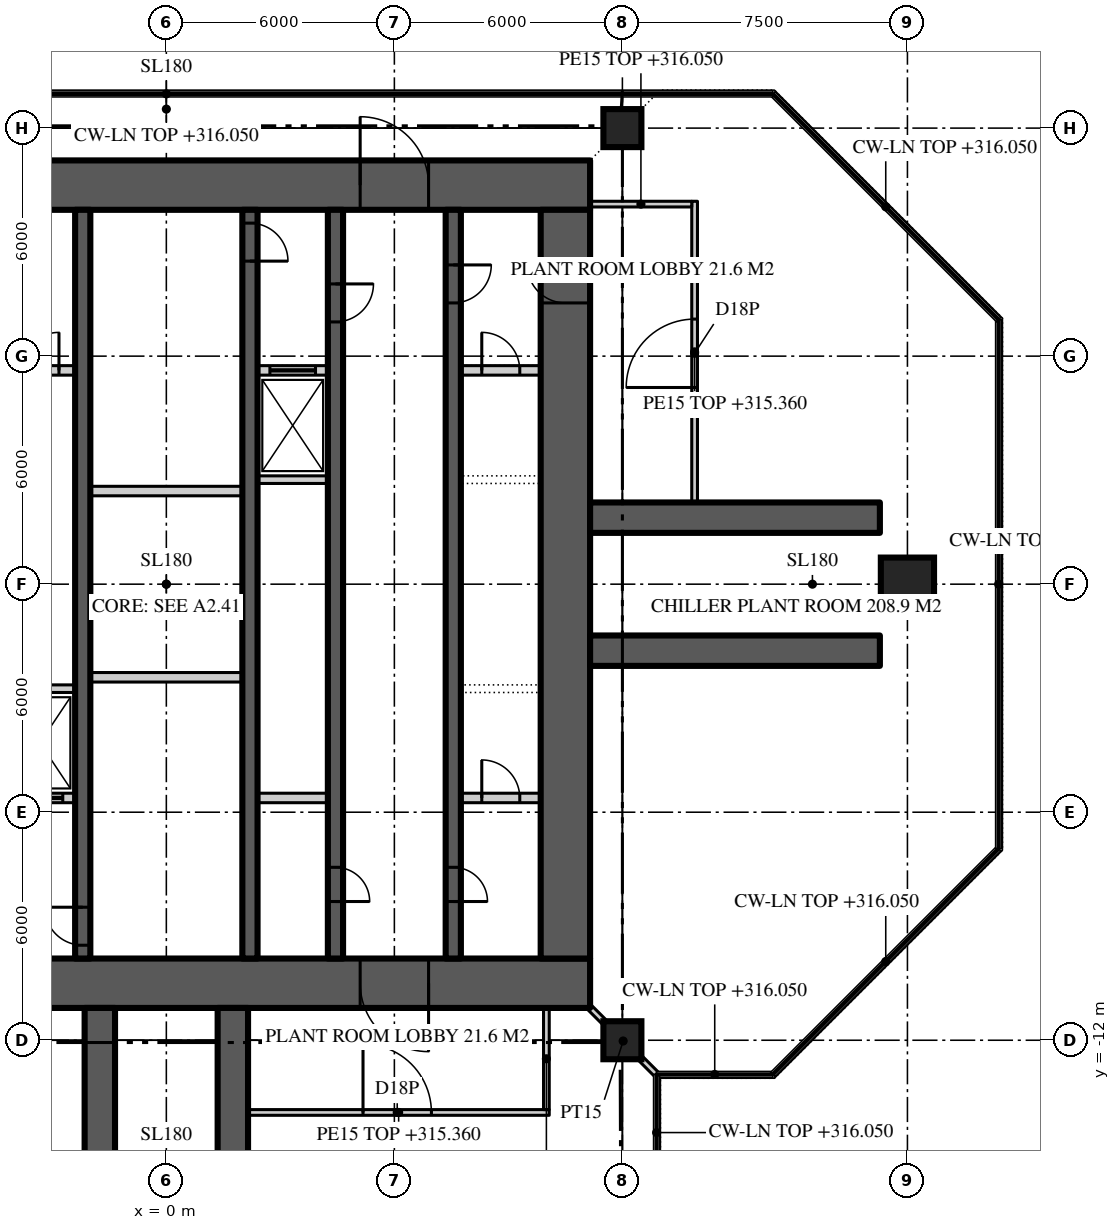
"""IFC4 building model, lengths in metres.
Left out: names, types, materials, properties, quantities, classifications, styles, units other than length and angle.
Written with IfcOpenShell. Run it as: python <this file> out.ifc"""

import sys

from ifc_helpers import new_model, si_unit, direction, frame, frame_2d, origin, origin_2d, place, context, subcontext, project, spatial, rectangle, extrude, element, fill, save


model = new_model("IFC4")
c1 = context("Model", 3, precision=1e-05, world=origin(), true_north=direction((0.0, 1.0)))
c2 = subcontext(c1, "Body", "Model", "MODEL_VIEW")
j1 = project(units=[si_unit("LENGTHUNIT", "METRE"), si_unit("PLANEANGLEUNIT", "RADIAN")], contexts=[c1])
p1 = place(None, origin())
s1 = spatial("IfcSite", under=j1, at=p1, CompositionType="ELEMENT")
p2 = place(p1, origin())
s2 = spatial("IfcBuilding", under=s1, at=p2, CompositionType="ELEMENT")
p3 = place(p2, frame((0.0, 0.0, 311.3)))
s3 = spatial("IfcBuildingStorey", under=s2, at=p3, CompositionType="ELEMENT", Elevation=311.3)
p4 = place(p3, frame((-11.15, 10.5, 0.0), z_axis=(0.0, 0.0, 1.0), x_axis=(1.0, 0.0, 0.0)))
e1 = element("IfcWall", 1, at=p4, inside=s3, PredefinedType="SHEAR", context=c2, shape_type="SweptSolid", body=[
    extrude(rectangle(XDim=22.3, YDim=1.3, at=frame_2d((11.15, 0.0))), origin(), (0.0, 0.0, 1.0), 5.0),
])
p5 = place(p4, frame((4.25, 0.0, 0.0)))
e2 = element("IfcOpeningElement", 2, at=p5, cuts=e1, PredefinedType="OPENING", context=c2, shape_type="SweptSolid", body=[
    extrude(rectangle(XDim=1.8, YDim=2.2, at=frame_2d((0.9, 1.1))), frame((0.0, 0.66, 0.0), z_axis=(0.0, -1.0, 0.0), x_axis=(1.0, 0.0, 0.0)), (0.0, 0.0, 1.0), 1.32),
])
p6 = place(p4, frame((16.25, 0.0, 0.0)))
e3 = element("IfcOpeningElement", 3, at=p6, cuts=e1, PredefinedType="OPENING", context=c2, shape_type="SweptSolid", body=[
    extrude(rectangle(XDim=1.8, YDim=2.2, at=frame_2d((0.9, 1.1))), frame((0.0, 0.66, 0.0), z_axis=(0.0, -1.0, 0.0), x_axis=(1.0, 0.0, 0.0)), (0.0, 0.0, 1.0), 1.32),
])
p7 = place(p3, frame((11.15, -10.5, 0.0), z_axis=(0.0, 0.0, 1.0), x_axis=(-1.0, 0.0, 0.0)))
e4 = element("IfcWall", 4, at=p7, inside=s3, PredefinedType="SHEAR", context=c2, shape_type="SweptSolid", body=[
    extrude(rectangle(XDim=22.3, YDim=1.3, at=frame_2d((11.15, 0.0))), origin(), (0.0, 0.0, 1.0), 5.0),
])
p8 = place(p7, frame((16.25, 0.0, 0.0)))
e5 = element("IfcOpeningElement", 5, at=p8, cuts=e4, PredefinedType="OPENING", context=c2, shape_type="SweptSolid", body=[
    extrude(rectangle(XDim=1.8, YDim=2.2, at=frame_2d((0.9, 1.1))), frame((0.0, 0.66, 0.0), z_axis=(0.0, -1.0, 0.0), x_axis=(1.0, 0.0, 0.0)), (0.0, 0.0, 1.0), 1.32),
])
p9 = place(p7, frame((4.25, 0.0, 0.0)))
e6 = element("IfcOpeningElement", 6, at=p9, cuts=e4, PredefinedType="OPENING", context=c2, shape_type="SweptSolid", body=[
    extrude(rectangle(XDim=1.8, YDim=2.2, at=frame_2d((0.9, 1.1))), frame((0.0, 0.66, 0.0), z_axis=(0.0, -1.0, 0.0), x_axis=(1.0, 0.0, 0.0)), (0.0, 0.0, 1.0), 1.32),
])
p10 = place(p3, frame((10.5, -9.85, 0.0), z_axis=(0.0, 0.0, 1.0), x_axis=(0.0, 1.0, 0.0)))
e7 = element("IfcWall", 7, at=p10, inside=s3, PredefinedType="SHEAR", context=c2, shape_type="SweptSolid", body=[
    extrude(rectangle(XDim=19.7, YDim=1.3, at=frame_2d((9.85, 0.0))), origin(), (0.0, 0.0, 1.0), 5.0),
])
p11 = place(p10, frame((17.25, 0.0, 0.0)))
e8 = element("IfcOpeningElement", 8, at=p11, cuts=e7, PredefinedType="OPENING", context=c2, shape_type="SweptSolid", body=[
    extrude(rectangle(XDim=1.0, YDim=2.2, at=frame_2d((0.5, 1.1))), frame((0.0, 0.66, 0.0), z_axis=(0.0, -1.0, 0.0), x_axis=(1.0, 0.0, 0.0)), (0.0, 0.0, 1.0), 1.32),
])
for number, where, z_axis, x_axis in (
    (9, (11.15, -1.75, 0.0), (0.0, 0.0, 1.0), (1.0, 0.0, 0.0)),
    (10, (11.15, 1.75, 0.0), (0.0, 0.0, 1.0), (1.0, 0.0, 0.0)),
    (11, (-1.75, -11.15, 0.0), (0.0, 0.0, 1.0), (0.0, -1.0, 0.0)),
    (12, (1.75, -11.15, 0.0), (0.0, 0.0, 1.0), (0.0, -1.0, 0.0)),
):
    element("IfcWall", number, at=place(p3, frame(where, z_axis=z_axis, x_axis=x_axis)), inside=s3, PredefinedType="SHEAR", context=c2, shape_type="SweptSolid", body=[
        extrude(rectangle(XDim=7.625, YDim=0.8, at=frame_2d((3.812, 0.0))), origin(), (0.0, 0.0, 1.0), 5.0),
    ])
p12 = place(p3, frame((12.0, -12.0, 0.0), z_axis=(0.0, 0.0, 1.0), x_axis=(1.0, 0.0, 0.0)))
e13 = element("IfcColumn", 13, at=p12, inside=s3, PredefinedType="COLUMN", context=c2, shape_type="SweptSolid", body=[
    extrude(rectangle(XDim=1.0, YDim=1.0, at=origin_2d()), origin(), (0.0, 0.0, 1.0), 5.0),
])
p13 = place(p3, frame((19.5, 0.0, 0.0), z_axis=(0.0, 0.0, 1.0), x_axis=(1.0, 0.0, 0.0)))
e14 = element("IfcColumn", 14, at=p13, inside=s3, PredefinedType="COLUMN", context=c2, shape_type="SweptSolid", body=[
    extrude(rectangle(XDim=1.4, YDim=1.4, at=origin_2d()), origin(), (0.0, 0.0, 1.0), 5.0),
])
p14 = place(p3, frame((12.0, 12.0, 0.0), z_axis=(0.0, 0.0, 1.0), x_axis=(1.0, 0.0, 0.0)))
e15 = element("IfcColumn", 15, at=p14, inside=s3, PredefinedType="COLUMN", context=c2, shape_type="SweptSolid", body=[
    extrude(rectangle(XDim=1.0, YDim=1.0, at=origin_2d()), origin(), (0.0, 0.0, 1.0), 5.0),
])
p15 = place(p3, frame((7.55, 9.85, 0.0), z_axis=(0.0, 0.0, 1.0), x_axis=(0.0, -1.0, 0.0)))
e16 = element("IfcWall", 16, at=p15, inside=s3, PredefinedType="SHEAR", context=c2, shape_type="SweptSolid", body=[
    extrude(rectangle(XDim=19.7, YDim=0.4, at=frame_2d((9.85, 0.0))), origin(), (0.0, 0.0, 1.0), 4.75),
])
p16 = place(p15, frame((1.45, 0.0, 0.0)))
e17 = element("IfcOpeningElement", 17, at=p16, cuts=e16, PredefinedType="OPENING", context=c2, shape_type="SweptSolid", body=[
    extrude(rectangle(XDim=1.0, YDim=2.2, at=frame_2d((0.5, 1.1))), frame((0.0, 0.21, 0.0), z_axis=(0.0, -1.0, 0.0), x_axis=(1.0, 0.0, 0.0)), (0.0, 0.0, 1.0), 0.42),
])
p17 = place(p15, frame((17.3, 0.0, 0.0)))
e18 = element("IfcOpeningElement", 18, at=p17, cuts=e16, PredefinedType="OPENING", context=c2, shape_type="SweptSolid", body=[
    extrude(rectangle(XDim=0.9, YDim=2.1, at=frame_2d((0.45, 1.05))), frame((0.0, 0.21, 0.0), z_axis=(0.0, -1.0, 0.0), x_axis=(1.0, 0.0, 0.0)), (0.0, 0.0, 1.0), 0.42),
])
p18 = place(p3, frame((4.45, 9.85, 0.0), z_axis=(0.0, 0.0, 1.0), x_axis=(0.0, -1.0, 0.0)))
e19 = element("IfcWall", 19, at=p18, inside=s3, PredefinedType="SHEAR", context=c2, shape_type="SweptSolid", body=[
    extrude(rectangle(XDim=19.7, YDim=0.4, at=frame_2d((9.85, 0.0))), origin(), (0.0, 0.0, 1.0), 4.75),
])
p19 = place(p18, frame((1.95, 0.0, 0.0)))
e20 = element("IfcOpeningElement", 20, at=p19, cuts=e19, PredefinedType="OPENING", context=c2, shape_type="SweptSolid", body=[
    extrude(rectangle(XDim=1.0, YDim=2.2, at=frame_2d((0.5, 1.1))), frame((0.0, 0.21, 0.0), z_axis=(0.0, -1.0, 0.0), x_axis=(1.0, 0.0, 0.0)), (0.0, 0.0, 1.0), 0.42),
])
p20 = place(p18, frame((17.3, 0.0, 0.0)))
e21 = element("IfcOpeningElement", 21, at=p20, cuts=e19, PredefinedType="OPENING", context=c2, shape_type="SweptSolid", body=[
    extrude(rectangle(XDim=0.9, YDim=2.1, at=frame_2d((0.45, 1.05))), frame((0.0, 0.21, 0.0), z_axis=(0.0, -1.0, 0.0), x_axis=(1.0, 0.0, 0.0)), (0.0, 0.0, 1.0), 0.42),
])
p21 = place(p3, frame((-2.2, -9.85, 0.0), z_axis=(0.0, 0.0, 1.0), x_axis=(0.0, 1.0, 0.0)))
e22 = element("IfcWall", 22, at=p21, inside=s3, PredefinedType="SHEAR", context=c2, shape_type="SweptSolid", body=[
    extrude(rectangle(XDim=19.7, YDim=0.4, at=frame_2d((9.85, 0.0))), origin(), (0.0, 0.0, 1.0), 4.75),
])
p22 = place(p21, frame((0.35, 0.0, 0.0)))
e23 = element("IfcOpeningElement", 23, at=p22, cuts=e22, PredefinedType="OPENING", context=c2, shape_type="SweptSolid", body=[
    extrude(rectangle(XDim=1.0, YDim=2.2, at=frame_2d((0.5, 1.1))), frame((0.0, 0.21, 0.0), z_axis=(0.0, -1.0, 0.0), x_axis=(1.0, 0.0, 0.0)), (0.0, 0.0, 1.0), 0.42),
])
p23 = place(p3, frame((2.2, 9.85, 0.0), z_axis=(0.0, 0.0, 1.0), x_axis=(0.0, -1.0, 0.0)))
e24 = element("IfcWall", 24, at=p23, inside=s3, PredefinedType="SHEAR", context=c2, shape_type="SweptSolid", body=[
    extrude(rectangle(XDim=19.7, YDim=0.4, at=frame_2d((9.85, 0.0))), origin(), (0.0, 0.0, 1.0), 4.75),
])
p24 = place(p23, frame((0.35, 0.0, 0.0)))
e25 = element("IfcOpeningElement", 25, at=p24, cuts=e24, PredefinedType="OPENING", context=c2, shape_type="SweptSolid", body=[
    extrude(rectangle(XDim=1.0, YDim=2.2, at=frame_2d((0.5, 1.1))), frame((0.0, 0.21, 0.0), z_axis=(0.0, -1.0, 0.0), x_axis=(1.0, 0.0, 0.0)), (0.0, 0.0, 1.0), 0.42),
])
p25 = place(p3, frame((-4.25, 5.625, 0.0), z_axis=(0.0, 0.0, 1.0), x_axis=(1.0, 0.0, 0.0)))
e26 = element("IfcWall", 26, at=p25, inside=s3, PredefinedType="SOLIDWALL", context=c2, shape_type="SweptSolid", body=[
    extrude(rectangle(XDim=1.85, YDim=0.25, at=frame_2d((0.925, 0.0))), origin(), (0.0, 0.0, 1.0), 4.75),
])
p26 = place(p25, frame((0.425, 0.0, 0.0)))
e27 = element("IfcOpeningElement", 27, at=p26, cuts=e26, PredefinedType="OPENING", context=c2, shape_type="SweptSolid", body=[
    extrude(rectangle(XDim=1.0, YDim=2.2, at=frame_2d((0.5, 1.1))), frame((0.0, 0.135, 0.0), z_axis=(0.0, -1.0, 0.0), x_axis=(1.0, 0.0, 0.0)), (0.0, 0.0, 1.0), 0.27),
])
p27 = place(p3, frame((2.4, 5.625, 0.0), z_axis=(0.0, 0.0, 1.0), x_axis=(1.0, 0.0, 0.0)))
e28 = element("IfcWall", 28, at=p27, inside=s3, PredefinedType="SOLIDWALL", context=c2, shape_type="SweptSolid", body=[
    extrude(rectangle(XDim=1.85, YDim=0.25, at=frame_2d((0.925, 0.0))), origin(), (0.0, 0.0, 1.0), 4.75),
])
p28 = place(p27, frame((0.325, 0.0, 0.0)))
e29 = element("IfcOpeningElement", 29, at=p28, cuts=e28, PredefinedType="OPENING", context=c2, shape_type="SweptSolid", body=[
    extrude(rectangle(XDim=1.2, YDim=2.2, at=frame_2d((0.6, 1.1))), frame((0.0, 0.135, 0.0), z_axis=(0.0, -1.0, 0.0), x_axis=(1.0, 0.0, 0.0)), (0.0, 0.0, 1.0), 0.27),
])
p29 = place(p3, frame((7.75, 5.625, 0.0), z_axis=(0.0, 0.0, 1.0), x_axis=(1.0, 0.0, 0.0)))
e30 = element("IfcWall", 30, at=p29, inside=s3, PredefinedType="SOLIDWALL", context=c2, shape_type="SweptSolid", body=[
    extrude(rectangle(XDim=2.1, YDim=0.25, at=frame_2d((1.05, 0.0))), origin(), (0.0, 0.0, 1.0), 4.75),
])
p30 = place(p29, frame((0.55, 0.0, 0.0)))
e31 = element("IfcOpeningElement", 31, at=p30, cuts=e30, PredefinedType="OPENING", context=c2, shape_type="SweptSolid", body=[
    extrude(rectangle(XDim=1.0, YDim=2.2, at=frame_2d((0.5, 1.1))), frame((0.0, 0.135, 0.0), z_axis=(0.0, -1.0, 0.0), x_axis=(1.0, 0.0, 0.0)), (0.0, 0.0, 1.0), 0.27),
])
p31 = place(p3, frame((-4.25, -5.625, 0.0), z_axis=(0.0, 0.0, 1.0), x_axis=(1.0, 0.0, 0.0)))
e32 = element("IfcWall", 32, at=p31, inside=s3, PredefinedType="SOLIDWALL", context=c2, shape_type="SweptSolid", body=[
    extrude(rectangle(XDim=1.85, YDim=0.25, at=frame_2d((0.925, 0.0))), origin(), (0.0, 0.0, 1.0), 4.75),
])
p32 = place(p31, frame((0.325, 0.0, 0.0)))
e33 = element("IfcOpeningElement", 33, at=p32, cuts=e32, PredefinedType="OPENING", context=c2, shape_type="SweptSolid", body=[
    extrude(rectangle(XDim=1.2, YDim=2.2, at=frame_2d((0.6, 1.1))), frame((0.0, 0.135, 0.0), z_axis=(0.0, -1.0, 0.0), x_axis=(1.0, 0.0, 0.0)), (0.0, 0.0, 1.0), 0.27),
])
p33 = place(p3, frame((2.4, -5.625, 0.0), z_axis=(0.0, 0.0, 1.0), x_axis=(1.0, 0.0, 0.0)))
e34 = element("IfcWall", 34, at=p33, inside=s3, PredefinedType="SOLIDWALL", context=c2, shape_type="SweptSolid", body=[
    extrude(rectangle(XDim=1.85, YDim=0.25, at=frame_2d((0.925, 0.0))), origin(), (0.0, 0.0, 1.0), 4.75),
])
p34 = place(p3, frame((7.75, -5.625, 0.0), z_axis=(0.0, 0.0, 1.0), x_axis=(1.0, 0.0, 0.0)))
e35 = element("IfcWall", 35, at=p34, inside=s3, PredefinedType="SOLIDWALL", context=c2, shape_type="SweptSolid", body=[
    extrude(rectangle(XDim=2.1, YDim=0.25, at=frame_2d((1.05, 0.0))), origin(), (0.0, 0.0, 1.0), 4.75),
])
p35 = place(p34, frame((0.55, 0.0, 0.0)))
e36 = element("IfcOpeningElement", 36, at=p35, cuts=e35, PredefinedType="OPENING", context=c2, shape_type="SweptSolid", body=[
    extrude(rectangle(XDim=1.0, YDim=2.2, at=frame_2d((0.5, 1.1))), frame((0.0, 0.135, 0.0), z_axis=(0.0, -1.0, 0.0), x_axis=(1.0, 0.0, 0.0)), (0.0, 0.0, 1.0), 0.27),
])
for number, where, z_axis, x_axis in (
    (37, (-2.0, -2.45, 0.0), (0.0, 0.0, 1.0), (1.0, 0.0, 0.0)),
    (38, (-2.0, 2.45, 0.0), (0.0, 0.0, 1.0), (1.0, 0.0, 0.0)),
):
    element("IfcWall", number, at=place(p3, frame(where, z_axis=z_axis, x_axis=x_axis)), inside=s3, PredefinedType="SOLIDWALL", context=c2, shape_type="SweptSolid", body=[
        extrude(rectangle(XDim=4.0, YDim=0.25, at=frame_2d((2.0, 0.0))), origin(), (0.0, 0.0, 1.0), 4.75),
    ])
for number, where, z_axis, x_axis in (
    (39, (-4.25, -2.75, 0.0), (0.0, 0.0, 1.0), (1.0, 0.0, 0.0)),
    (40, (2.4, 2.75, 0.0), (0.0, 0.0, 1.0), (1.0, 0.0, 0.0)),
):
    element("IfcWall", number, at=place(p3, frame(where, z_axis=z_axis, x_axis=x_axis)), inside=s3, PredefinedType="SOLIDWALL", context=c2, shape_type="SweptSolid", body=[
        extrude(rectangle(XDim=1.85, YDim=0.2, at=frame_2d((0.925, 0.0))), origin(), (0.0, 0.0, 1.0), 4.75),
    ])
p36 = place(p3, frame((13.9, 2.15, 0.0), z_axis=(0.0, 0.0, 1.0), x_axis=(0.0, 1.0, 0.0)))
e41 = element("IfcWall", 41, at=p36, inside=s3, PredefinedType="SOLIDWALL", context=c2, shape_type="SweptSolid", body=[
    extrude(rectangle(XDim=7.925, YDim=0.15, at=frame_2d((3.962, 0.0))), origin(), (0.0, 0.0, 1.0), 4.06),
])
p37 = place(p36, frame((3.025, 0.0, 0.0)))
e42 = element("IfcOpeningElement", 42, at=p37, cuts=e41, PredefinedType="OPENING", context=c2, shape_type="SweptSolid", body=[
    extrude(rectangle(XDim=1.8, YDim=2.4, at=frame_2d((0.9, 1.2))), frame((0.0, 0.085, 0.0), z_axis=(0.0, -1.0, 0.0), x_axis=(1.0, 0.0, 0.0)), (0.0, 0.0, 1.0), 0.17),
])
p38 = place(p3, frame((11.15, 10.0, 0.0), z_axis=(0.0, 0.0, 1.0), x_axis=(1.0, 0.0, 0.0)))
e43 = element("IfcWall", 43, at=p38, inside=s3, PredefinedType="SOLIDWALL", context=c2, shape_type="SweptSolid", body=[
    extrude(rectangle(XDim=2.675, YDim=0.15, at=frame_2d((1.337, 0.0))), origin(), (0.0, 0.0, 1.0), 4.75),
])
p39 = place(p3, frame((2.15, -13.9, 0.0), z_axis=(0.0, 0.0, 1.0), x_axis=(1.0, 0.0, 0.0)))
e44 = element("IfcWall", 44, at=p39, inside=s3, PredefinedType="SOLIDWALL", context=c2, shape_type="SweptSolid", body=[
    extrude(rectangle(XDim=7.925, YDim=0.15, at=frame_2d((3.962, 0.0))), origin(), (0.0, 0.0, 1.0), 4.06),
])
p40 = place(p39, frame((3.025, 0.0, 0.0)))
e45 = element("IfcOpeningElement", 45, at=p40, cuts=e44, PredefinedType="OPENING", context=c2, shape_type="SweptSolid", body=[
    extrude(rectangle(XDim=1.8, YDim=2.4, at=frame_2d((0.9, 1.2))), frame((0.0, 0.085, 0.0), z_axis=(0.0, -1.0, 0.0), x_axis=(1.0, 0.0, 0.0)), (0.0, 0.0, 1.0), 0.17),
])
p41 = place(p3, frame((10.0, -11.15, 0.0), z_axis=(0.0, 0.0, 1.0), x_axis=(0.0, -1.0, 0.0)))
e46 = element("IfcWall", 46, at=p41, inside=s3, PredefinedType="SOLIDWALL", context=c2, shape_type="SweptSolid", body=[
    extrude(rectangle(XDim=2.675, YDim=0.15, at=frame_2d((1.337, 0.0))), origin(), (0.0, 0.0, 1.0), 4.75),
])
p42 = place(p3, frame((11.15, -11.15, 0.0), z_axis=(0.0, 0.0, 1.0), x_axis=(0.707106781187, -0.707106781187, 0.0)))
e47 = element("IfcWall", 47, at=p42, inside=s3, PredefinedType="PARTITIONING", context=c2, shape_type="SweptSolid", body=[
    extrude(rectangle(XDim=2.461, YDim=0.15, at=frame_2d((1.23, 0.0))), origin(), (0.0, 0.0, 1.0), 4.75),
])
p43 = place(p6, origin())
e48 = element("IfcDoor", 48, at=p43, inside=s3, OperationType="DOUBLE_DOOR_DOUBLE_SWING", PredefinedType="DOOR", context=c2, shape_type="SweptSolid", body=[
    extrude(rectangle(XDim=1.8, YDim=2.2, at=frame_2d((0.9, 1.1))), frame((0.0, 0.025, 0.0), z_axis=(0.0, -1.0, 0.0), x_axis=(1.0, 0.0, 0.0)), (0.0, 0.0, 1.0), 0.05),
])
fill(e3, e48)
p44 = place(p9, origin())
e49 = element("IfcDoor", 49, at=p44, inside=s3, OperationType="DOUBLE_DOOR_DOUBLE_SWING", PredefinedType="DOOR", context=c2, shape_type="SweptSolid", body=[
    extrude(rectangle(XDim=1.8, YDim=2.2, at=frame_2d((0.9, 1.1))), frame((0.0, 0.025, 0.0), z_axis=(0.0, -1.0, 0.0), x_axis=(1.0, 0.0, 0.0)), (0.0, 0.0, 1.0), 0.05),
])
fill(e6, e49)
p45 = place(p16, origin())
e50 = element("IfcDoor", 50, at=p45, inside=s3, OperationType="SINGLE_SWING_LEFT", PredefinedType="DOOR", context=c2, shape_type="SweptSolid", body=[
    extrude(rectangle(XDim=1.0, YDim=2.2, at=frame_2d((0.5, 1.1))), frame((0.0, 0.025, 0.0), z_axis=(0.0, -1.0, 0.0), x_axis=(1.0, 0.0, 0.0)), (0.0, 0.0, 1.0), 0.05),
])
fill(e17, e50)
p46 = place(p11, origin())
e51 = element("IfcDoor", 51, at=p46, inside=s3, OperationType="SINGLE_SWING_RIGHT", PredefinedType="DOOR", context=c2, shape_type="SweptSolid", body=[
    extrude(rectangle(XDim=1.0, YDim=2.2, at=frame_2d((0.5, 1.1))), frame((0.0, 0.025, 0.0), z_axis=(0.0, -1.0, 0.0), x_axis=(1.0, 0.0, 0.0)), (0.0, 0.0, 1.0), 0.05),
])
fill(e8, e51)
p47 = place(p22, origin())
e52 = element("IfcDoor", 52, at=p47, inside=s3, OperationType="SINGLE_SWING_RIGHT", PredefinedType="DOOR", context=c2, shape_type="SweptSolid", body=[
    extrude(rectangle(XDim=1.0, YDim=2.2, at=frame_2d((0.5, 1.1))), frame((0.0, 0.025, 0.0), z_axis=(0.0, -1.0, 0.0), x_axis=(1.0, 0.0, 0.0)), (0.0, 0.0, 1.0), 0.05),
])
fill(e23, e52)
p48 = place(p19, origin())
e53 = element("IfcDoor", 53, at=p48, inside=s3, OperationType="SINGLE_SWING_LEFT", PredefinedType="DOOR", context=c2, shape_type="SweptSolid", body=[
    extrude(rectangle(XDim=1.0, YDim=2.2, at=frame_2d((0.5, 1.1))), frame((0.0, 0.025, 0.0), z_axis=(0.0, -1.0, 0.0), x_axis=(1.0, 0.0, 0.0)), (0.0, 0.0, 1.0), 0.05),
])
fill(e20, e53)
p49 = place(p24, origin())
e54 = element("IfcDoor", 54, at=p49, inside=s3, OperationType="SINGLE_SWING_RIGHT", PredefinedType="DOOR", context=c2, shape_type="SweptSolid", body=[
    extrude(rectangle(XDim=1.0, YDim=2.2, at=frame_2d((0.5, 1.1))), frame((0.0, 0.025, 0.0), z_axis=(0.0, -1.0, 0.0), x_axis=(1.0, 0.0, 0.0)), (0.0, 0.0, 1.0), 0.05),
])
fill(e25, e54)
p50 = place(p17, origin())
e55 = element("IfcDoor", 55, at=p50, inside=s3, OperationType="SINGLE_SWING_RIGHT", PredefinedType="DOOR", context=c2, shape_type="SweptSolid", body=[
    extrude(rectangle(XDim=0.9, YDim=2.1, at=frame_2d((0.45, 1.05))), frame((0.0, 0.025, 0.0), z_axis=(0.0, -1.0, 0.0), x_axis=(1.0, 0.0, 0.0)), (0.0, 0.0, 1.0), 0.05),
])
fill(e18, e55)
p51 = place(p20, origin())
e56 = element("IfcDoor", 56, at=p51, inside=s3, OperationType="SINGLE_SWING_RIGHT", PredefinedType="DOOR", context=c2, shape_type="SweptSolid", body=[
    extrude(rectangle(XDim=0.9, YDim=2.1, at=frame_2d((0.45, 1.05))), frame((0.0, 0.025, 0.0), z_axis=(0.0, -1.0, 0.0), x_axis=(1.0, 0.0, 0.0)), (0.0, 0.0, 1.0), 0.05),
])
fill(e21, e56)
p52 = place(p32, origin())
e57 = element("IfcDoor", 57, at=p52, inside=s3, OperationType="SLIDING_TO_LEFT", PredefinedType="DOOR", context=c2, shape_type="SweptSolid", body=[
    extrude(rectangle(XDim=1.2, YDim=2.2, at=frame_2d((0.6, 1.1))), frame((0.0, 0.025, 0.0), z_axis=(0.0, -1.0, 0.0), x_axis=(1.0, 0.0, 0.0)), (0.0, 0.0, 1.0), 0.05),
])
fill(e33, e57)
p53 = place(p28, origin())
e58 = element("IfcDoor", 58, at=p53, inside=s3, OperationType="SLIDING_TO_LEFT", PredefinedType="DOOR", context=c2, shape_type="SweptSolid", body=[
    extrude(rectangle(XDim=1.2, YDim=2.2, at=frame_2d((0.6, 1.1))), frame((0.0, 0.025, 0.0), z_axis=(0.0, -1.0, 0.0), x_axis=(1.0, 0.0, 0.0)), (0.0, 0.0, 1.0), 0.05),
])
fill(e29, e58)
p54 = place(p37, origin())
e59 = element("IfcDoor", 59, at=p54, inside=s3, OperationType="DOUBLE_DOOR_DOUBLE_SWING", PredefinedType="DOOR", context=c2, shape_type="SweptSolid", body=[
    extrude(rectangle(XDim=1.8, YDim=2.4, at=frame_2d((0.9, 1.2))), frame((0.0, 0.025, 0.0), z_axis=(0.0, -1.0, 0.0), x_axis=(1.0, 0.0, 0.0)), (0.0, 0.0, 1.0), 0.05),
])
fill(e42, e59)
p55 = place(p40, origin())
e60 = element("IfcDoor", 60, at=p55, inside=s3, OperationType="DOUBLE_DOOR_DOUBLE_SWING", PredefinedType="DOOR", context=c2, shape_type="SweptSolid", body=[
    extrude(rectangle(XDim=1.8, YDim=2.4, at=frame_2d((0.9, 1.2))), frame((0.0, 0.025, 0.0), z_axis=(0.0, -1.0, 0.0), x_axis=(1.0, 0.0, 0.0)), (0.0, 0.0, 1.0), 0.05),
])
fill(e45, e60)
p56 = place(p26, origin())
e61 = element("IfcDoor", 61, at=p56, inside=s3, OperationType="SINGLE_SWING_RIGHT", PredefinedType="DOOR", context=c2, shape_type="SweptSolid", body=[
    extrude(rectangle(XDim=1.0, YDim=2.2, at=frame_2d((0.5, 1.1))), frame((0.0, 0.025, 0.0), z_axis=(0.0, -1.0, 0.0), x_axis=(1.0, 0.0, 0.0)), (0.0, 0.0, 1.0), 0.05),
])
fill(e27, e61)
p57 = place(p30, origin())
e62 = element("IfcDoor", 62, at=p57, inside=s3, OperationType="SINGLE_SWING_LEFT", PredefinedType="DOOR", context=c2, shape_type="SweptSolid", body=[
    extrude(rectangle(XDim=1.0, YDim=2.2, at=frame_2d((0.5, 1.1))), frame((0.0, 0.025, 0.0), z_axis=(0.0, -1.0, 0.0), x_axis=(1.0, 0.0, 0.0)), (0.0, 0.0, 1.0), 0.05),
])
fill(e31, e62)
p58 = place(p35, origin())
e63 = element("IfcDoor", 63, at=p58, inside=s3, OperationType="SINGLE_SWING_LEFT", PredefinedType="DOOR", context=c2, shape_type="SweptSolid", body=[
    extrude(rectangle(XDim=1.0, YDim=2.2, at=frame_2d((0.5, 1.1))), frame((0.0, 0.025, 0.0), z_axis=(0.0, -1.0, 0.0), x_axis=(1.0, 0.0, 0.0)), (0.0, 0.0, 1.0), 0.05),
])
fill(e36, e63)
save(model, sys.argv[1])
